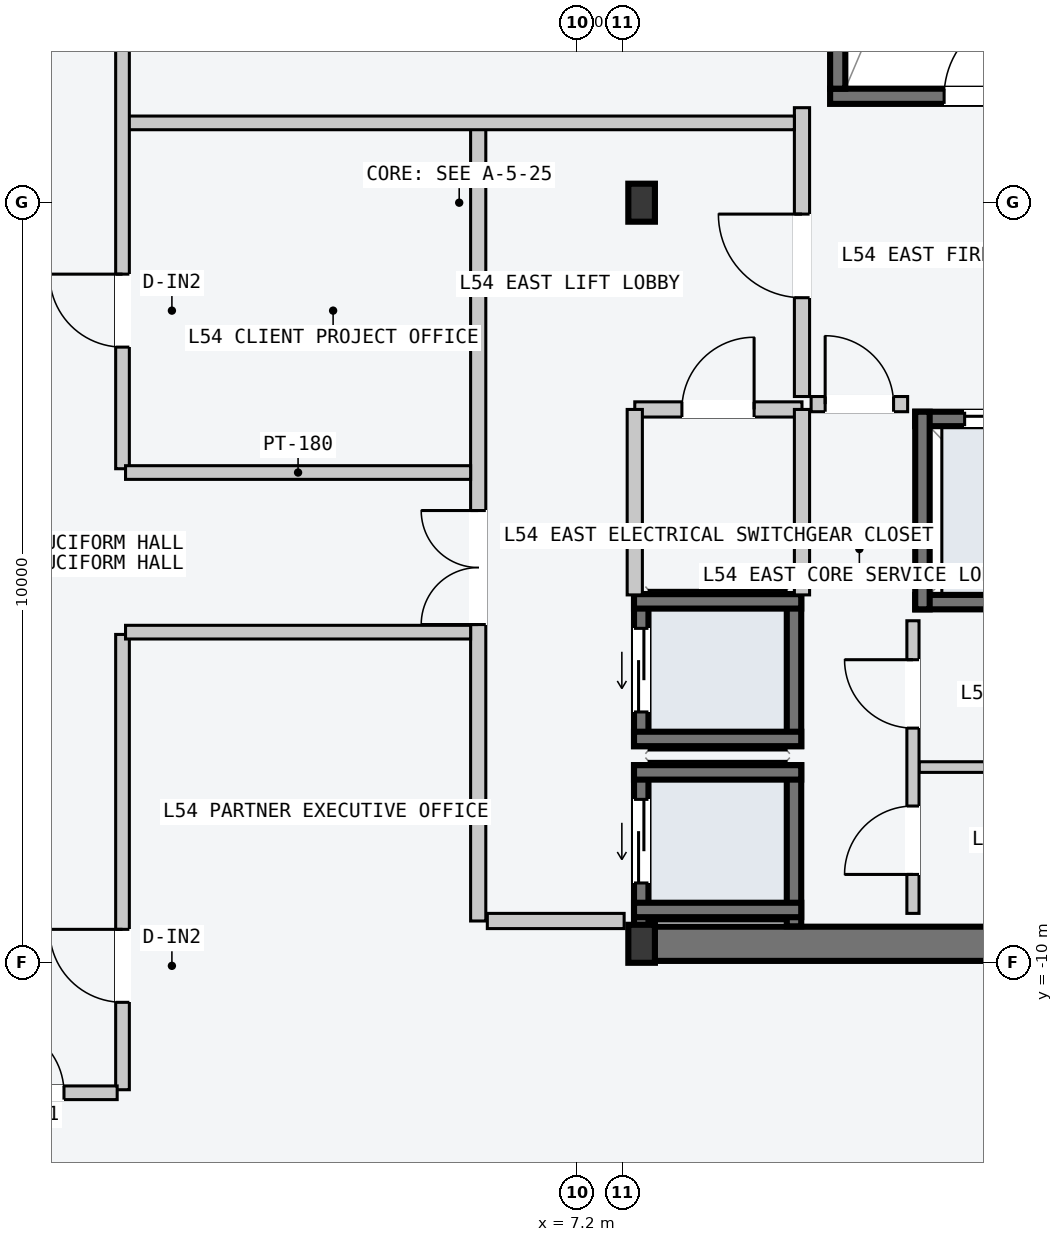
"""IFC4 building model, lengths in metres.
Left out: names, types, materials, properties, quantities, classifications, styles, units other than length and angle.
Written with IfcOpenShell. Run it as: python <this file> out.ifc"""

import sys

from ifc_helpers import new_model, si_unit, direction, frame, frame_2d, origin, origin_2d, place, context, subcontext, project, spatial, rectangle, i_section, extrude, element, fill, save


model = new_model("IFC4")
c1 = context("Model", 3, precision=1e-05, world=origin(), true_north=direction((0.0, 1.0)))
c2 = subcontext(c1, "Body", "Model", "MODEL_VIEW")
j1 = project(units=[si_unit("LENGTHUNIT", "METRE"), si_unit("PLANEANGLEUNIT", "RADIAN")], contexts=[c1])
p1 = place(None, origin())
s1 = spatial("IfcSite", under=j1, at=p1, CompositionType="ELEMENT")
p2 = place(p1, origin())
s2 = spatial("IfcBuilding", under=s1, at=p2, CompositionType="ELEMENT")
p3 = place(p2, frame((0.0, 0.0, 205.5)))
s3 = spatial("IfcBuildingStorey", under=s2, at=p3, CompositionType="ELEMENT", Elevation=205.5)
p4 = place(p3, frame((8.07, -9.75, -0.2), z_axis=(0.0, 0.0, 1.0), x_axis=(1.0, 0.0, 0.0)))
e1 = element("IfcWall", 1, at=p4, inside=s3, PredefinedType="SHEAR", context=c2, shape_type="SweptSolid", body=[
    extrude(rectangle(XDim=6.46, YDim=0.45, at=frame_2d((3.23, 0.0))), origin(), (0.0, 0.0, 1.0), 3.6),
])
p5 = place(p3, frame((10.53, 1.4, -0.2), z_axis=(0.0, 0.0, 1.0), x_axis=(1.0, 0.0, 0.0)))
e2 = element("IfcWall", 2, at=p5, inside=s3, PredefinedType="SOLIDWALL", context=c2, shape_type="SweptSolid", body=[
    extrude(rectangle(XDim=3.72, YDim=0.2, at=frame_2d((1.86, 0.0))), origin(), (0.0, 0.0, 1.0), 3.6),
])
p6 = place(p5, frame((1.5, 0.0, 0.2)))
e3 = element("IfcOpeningElement", 3, at=p6, cuts=e2, PredefinedType="OPENING", context=c2, shape_type="SweptSolid", body=[
    extrude(rectangle(XDim=1.12, YDim=2.18, at=frame_2d((0.56, 1.09))), frame((0.0, 0.11, 0.0), z_axis=(0.0, -1.0, 0.0), x_axis=(1.0, 0.0, 0.0)), (0.0, 0.0, 1.0), 0.22),
])
p7 = place(p3, frame((10.63, 1.5, -0.2), z_axis=(0.0, 0.0, 1.0), x_axis=(0.0, 1.0, 0.0)))
e4 = element("IfcWall", 4, at=p7, inside=s3, PredefinedType="SOLIDWALL", context=c2, shape_type="SweptSolid", body=[
    extrude(rectangle(XDim=7.8, YDim=0.2, at=frame_2d((3.9, 0.0))), origin(), (0.0, 0.0, 1.0), 3.6),
])
for number, where, z_axis, x_axis in (
    (5, (8.05, -9.75, 0.0), (0.0, 0.0, 1.0), (1.0, 0.0, 0.0)),
    (6, (8.05, 0.0, 0.0), (0.0, 0.0, 1.0), (1.0, 0.0, 0.0)),
):
    element("IfcColumn", number, at=place(p3, frame(where, z_axis=z_axis, x_axis=x_axis)), inside=s3, PredefinedType="COLUMN", context=c2, shape_type="SweptSolid", body=[
        extrude(i_section(OverallWidth=0.35, OverallDepth=0.5, WebThickness=0.02, FlangeThickness=0.032, at=origin_2d()), origin(), (0.0, 0.0, 1.0), 3.6),
    ])
p8 = place(p3, frame((8.045, -9.52, -0.2), z_axis=(0.0, 0.0, 1.0), x_axis=(0.0, 1.0, 0.0)))
e7 = element("IfcWall", 7, at=p8, inside=s3, PredefinedType="SOLIDWALL", context=c2, shape_type="SweptSolid", body=[
    extrude(rectangle(XDim=2.12, YDim=0.19, at=frame_2d((1.06, 0.0))), origin(), (0.0, 0.0, 1.0), 3.6),
])
p9 = place(p8, frame((0.57, 0.0, 0.2)))
e8 = element("IfcOpeningElement", 8, at=p9, cuts=e7, PredefinedType="OPENING", context=c2, shape_type="SweptSolid", body=[
    extrude(rectangle(XDim=1.1, YDim=2.2, at=frame_2d((0.55, 1.1))), frame((0.0, 0.105, 0.0), z_axis=(0.0, -1.0, 0.0), x_axis=(1.0, 0.0, 0.0)), (0.0, 0.0, 1.0), 0.21),
])
p10 = place(p3, frame((10.055, -9.52, -0.2), z_axis=(0.0, 0.0, 1.0), x_axis=(0.0, 1.0, 0.0)))
e9 = element("IfcWall", 9, at=p10, inside=s3, PredefinedType="SOLIDWALL", context=c2, shape_type="SweptSolid", body=[
    extrude(rectangle(XDim=2.12, YDim=0.19, at=frame_2d((1.06, 0.0))), origin(), (0.0, 0.0, 1.0), 3.6),
])
for number, where, z_axis, x_axis in (
    (10, (7.95, -7.495, -0.2), (0.0, 0.0, 1.0), (1.0, 0.0, 0.0)),
    (11, (7.95, -9.305, -0.2), (0.0, 0.0, 1.0), (1.0, 0.0, 0.0)),
):
    element("IfcWall", number, at=place(p3, frame(where, z_axis=z_axis, x_axis=x_axis)), inside=s3, PredefinedType="SOLIDWALL", context=c2, shape_type="SweptSolid", body=[
        extrude(rectangle(XDim=2.2, YDim=0.19, at=frame_2d((1.1, 0.0))), origin(), (0.0, 0.0, 1.0), 3.6),
    ])
p11 = place(p3, frame((8.045, -7.15, -0.2), z_axis=(0.0, 0.0, 1.0), x_axis=(0.0, 1.0, 0.0)))
e12 = element("IfcWall", 12, at=p11, inside=s3, PredefinedType="SOLIDWALL", context=c2, shape_type="SweptSolid", body=[
    extrude(rectangle(XDim=2.0, YDim=0.19, at=frame_2d((1.0, 0.0))), origin(), (0.0, 0.0, 1.0), 3.6),
])
p12 = place(p11, frame((0.45, 0.0, 0.2)))
e13 = element("IfcOpeningElement", 13, at=p12, cuts=e12, PredefinedType="OPENING", context=c2, shape_type="SweptSolid", body=[
    extrude(rectangle(XDim=1.1, YDim=2.2, at=frame_2d((0.55, 1.1))), frame((0.0, 0.105, 0.0), z_axis=(0.0, -1.0, 0.0), x_axis=(1.0, 0.0, 0.0)), (0.0, 0.0, 1.0), 0.21),
])
p13 = place(p3, frame((10.055, -7.15, -0.2), z_axis=(0.0, 0.0, 1.0), x_axis=(0.0, 1.0, 0.0)))
e14 = element("IfcWall", 14, at=p13, inside=s3, PredefinedType="SOLIDWALL", context=c2, shape_type="SweptSolid", body=[
    extrude(rectangle(XDim=2.0, YDim=0.19, at=frame_2d((1.0, 0.0))), origin(), (0.0, 0.0, 1.0), 3.6),
])
for number, where, z_axis, x_axis in (
    (15, (7.95, -5.245, -0.2), (0.0, 0.0, 1.0), (1.0, 0.0, 0.0)),
    (16, (7.95, -7.055, -0.2), (0.0, 0.0, 1.0), (1.0, 0.0, 0.0)),
):
    element("IfcWall", number, at=place(p3, frame(where, z_axis=z_axis, x_axis=x_axis)), inside=s3, PredefinedType="SOLIDWALL", context=c2, shape_type="SweptSolid", body=[
        extrude(rectangle(XDim=2.2, YDim=0.19, at=frame_2d((1.1, 0.0))), origin(), (0.0, 0.0, 1.0), 3.6),
    ])
p14 = place(p3, frame((11.65, -2.845, -0.2), z_axis=(0.0, 0.0, 1.0), x_axis=(1.0, 0.0, 0.0)))
e17 = element("IfcWall", 17, at=p14, inside=s3, PredefinedType="SOLIDWALL", context=c2, shape_type="SweptSolid", body=[
    extrude(rectangle(XDim=2.68, YDim=0.19, at=frame_2d((1.34, 0.0))), origin(), (0.0, 0.0, 1.0), 3.6),
])
p15 = place(p14, frame((0.65, 0.0, 0.2)))
e18 = element("IfcOpeningElement", 18, at=p15, cuts=e17, PredefinedType="OPENING", context=c2, shape_type="SweptSolid", body=[
    extrude(rectangle(XDim=1.2, YDim=2.2, at=frame_2d((0.6, 1.1))), frame((0.0, 0.105, 0.0), z_axis=(0.0, -1.0, 0.0), x_axis=(1.0, 0.0, 0.0)), (0.0, 0.0, 1.0), 0.21),
])
p16 = place(p3, frame((11.65, -5.255, -0.2), z_axis=(0.0, 0.0, 1.0), x_axis=(1.0, 0.0, 0.0)))
e19 = element("IfcWall", 19, at=p16, inside=s3, PredefinedType="SOLIDWALL", context=c2, shape_type="SweptSolid", body=[
    extrude(rectangle(XDim=2.68, YDim=0.19, at=frame_2d((1.34, 0.0))), origin(), (0.0, 0.0, 1.0), 3.6),
])
p17 = place(p3, frame((11.745, -5.35, -0.2), z_axis=(0.0, 0.0, 1.0), x_axis=(0.0, 1.0, 0.0)))
e20 = element("IfcWall", 20, at=p17, inside=s3, PredefinedType="SOLIDWALL", context=c2, shape_type="SweptSolid", body=[
    extrude(rectangle(XDim=2.6, YDim=0.19, at=frame_2d((1.3, 0.0))), origin(), (0.0, 0.0, 1.0), 3.6),
])
p18 = place(p3, frame((5.9, -9.45, 0.0), z_axis=(0.0, 0.0, 1.0), x_axis=(0.0, 1.0, 0.0)))
e21 = element("IfcWall", 21, at=p18, inside=s3, PredefinedType="PARTITIONING", context=c2, shape_type="SweptSolid", body=[
    extrude(rectangle(XDim=10.5, YDim=0.2, at=frame_2d((5.25, 0.0))), origin(), (0.0, 0.0, 1.0), 3.4),
])
p19 = place(p18, frame((3.9, 0.0, 0.0)))
e22 = element("IfcOpeningElement", 22, at=p19, cuts=e21, PredefinedType="OPENING", context=c2, shape_type="SweptSolid", body=[
    extrude(rectangle(XDim=1.5, YDim=2.2, at=frame_2d((0.75, 1.1))), frame((0.0, 0.11, 0.0), z_axis=(0.0, -1.0, 0.0), x_axis=(1.0, 0.0, 0.0)), (0.0, 0.0, 1.0), 0.22),
])
p20 = place(p3, frame((6.02, -9.45, 0.0), z_axis=(0.0, 0.0, 1.0), x_axis=(1.0, 0.0, 0.0)))
e23 = element("IfcWall", 23, at=p20, inside=s3, PredefinedType="PARTITIONING", context=c2, shape_type="SweptSolid", body=[
    extrude(rectangle(XDim=1.8, YDim=0.2, at=frame_2d((0.9, 0.0))), origin(), (0.0, 0.0, 1.0), 3.4),
])
p21 = place(p3, frame((10.16, -2.55, 0.0), z_axis=(0.0, 0.0, 1.0), x_axis=(0.0, 1.0, 0.0)))
e24 = element("IfcWall", 24, at=p21, inside=s3, PredefinedType="PARTITIONING", context=c2, shape_type="SweptSolid", body=[
    extrude(rectangle(XDim=3.8, YDim=0.2, at=frame_2d((1.9, 0.0))), origin(), (0.0, 0.0, 1.0), 3.4),
])
p22 = place(p21, frame((1.3, 0.0, 0.0)))
e25 = element("IfcOpeningElement", 25, at=p22, cuts=e24, PredefinedType="OPENING", context=c2, shape_type="SweptSolid", body=[
    extrude(rectangle(XDim=1.1, YDim=2.15, at=frame_2d((0.55, 1.075))), frame((0.0, 0.11, 0.0), z_axis=(0.0, -1.0, 0.0), x_axis=(1.0, 0.0, 0.0)), (0.0, 0.0, 1.0), 0.22),
])
p23 = place(p3, frame((10.28, -2.65, 0.0), z_axis=(0.0, 0.0, 1.0), x_axis=(1.0, 0.0, 0.0)))
e26 = element("IfcWall", 26, at=p23, inside=s3, PredefinedType="PARTITIONING", context=c2, shape_type="SweptSolid", body=[
    extrude(rectangle(XDim=1.27, YDim=0.2, at=frame_2d((0.635, 0.0))), origin(), (0.0, 0.0, 1.0), 3.4),
])
p24 = place(p23, frame((0.185, 0.0, 0.0)))
e27 = element("IfcOpeningElement", 27, at=p24, cuts=e26, PredefinedType="OPENING", context=c2, shape_type="SweptSolid", body=[
    extrude(rectangle(XDim=0.9, YDim=2.15, at=frame_2d((0.45, 1.075))), frame((0.0, 0.11, 0.0), z_axis=(0.0, -1.0, 0.0), x_axis=(1.0, 0.0, 0.0)), (0.0, 0.0, 1.0), 0.22),
])
p25 = place(p3, frame((7.96, -2.72, 0.0), z_axis=(0.0, 0.0, 1.0), x_axis=(1.0, 0.0, 0.0)))
e28 = element("IfcWall", 28, at=p25, inside=s3, PredefinedType="PARTITIONING", context=c2, shape_type="SweptSolid", body=[
    extrude(rectangle(XDim=2.2, YDim=0.2, at=frame_2d((1.1, 0.0))), origin(), (0.0, 0.0, 1.0), 3.4),
])
p26 = place(p25, frame((0.62, 0.0, 0.0)))
e29 = element("IfcOpeningElement", 29, at=p26, cuts=e28, PredefinedType="OPENING", context=c2, shape_type="SweptSolid", body=[
    extrude(rectangle(XDim=0.95, YDim=2.1, at=frame_2d((0.475, 1.05))), frame((0.0, 0.11, 0.0), z_axis=(0.0, -1.0, 0.0), x_axis=(1.0, 0.0, 0.0)), (0.0, 0.0, 1.0), 0.22),
])
for number, where, z_axis, x_axis in (
    (30, (7.96, -5.16, 0.0), (0.0, 0.0, 1.0), (0.0, 1.0, 0.0)),
    (31, (10.16, -5.16, 0.0), (0.0, 0.0, 1.0), (0.0, 1.0, 0.0)),
):
    element("IfcWall", number, at=place(p3, frame(where, z_axis=z_axis, x_axis=x_axis)), inside=s3, PredefinedType="PARTITIONING", context=c2, shape_type="SweptSolid", body=[
        extrude(rectangle(XDim=2.44, YDim=0.2, at=frame_2d((1.22, 0.0))), origin(), (0.0, 0.0, 1.0), 3.4),
    ])
p27 = place(p3, frame((11.7, -7.425, 0.0), z_axis=(0.0, 0.0, 1.0), x_axis=(1.0, 0.0, 0.0)))
e32 = element("IfcWall", 32, at=p27, inside=s3, PredefinedType="PARTITIONING", context=c2, shape_type="SweptSolid", body=[
    extrude(rectangle(XDim=2.5, YDim=0.14, at=frame_2d((1.25, 0.0))), origin(), (0.0, 0.0, 1.0), 3.4),
])
p28 = place(p3, frame((11.62, -9.35, 0.0), z_axis=(0.0, 0.0, 1.0), x_axis=(0.0, 1.0, 0.0)))
e33 = element("IfcWall", 33, at=p28, inside=s3, PredefinedType="PARTITIONING", context=c2, shape_type="SweptSolid", body=[
    extrude(rectangle(XDim=3.85, YDim=0.16, at=frame_2d((1.925, 0.0))), origin(), (0.0, 0.0, 1.0), 3.4),
])
p29 = place(p28, frame((0.512, 0.0, 0.0)))
e34 = element("IfcOpeningElement", 34, at=p29, cuts=e33, PredefinedType="OPENING", context=c2, shape_type="SweptSolid", body=[
    extrude(rectangle(XDim=0.9, YDim=2.15, at=frame_2d((0.45, 1.075))), frame((0.0, 0.09, 0.0), z_axis=(0.0, -1.0, 0.0), x_axis=(1.0, 0.0, 0.0)), (0.0, 0.0, 1.0), 0.18),
])
p30 = place(p28, frame((2.438, 0.0, 0.0)))
e35 = element("IfcOpeningElement", 35, at=p30, cuts=e33, PredefinedType="OPENING", context=c2, shape_type="SweptSolid", body=[
    extrude(rectangle(XDim=0.9, YDim=2.15, at=frame_2d((0.45, 1.075))), frame((0.0, 0.09, 0.0), z_axis=(0.0, -1.0, 0.0), x_axis=(1.0, 0.0, 0.0)), (0.0, 0.0, 1.0), 0.18),
])
p31 = place(p3, frame((1.26, 1.05, 0.0), z_axis=(0.0, 0.0, 1.0), x_axis=(1.0, 0.0, 0.0)))
e36 = element("IfcWall", 36, at=p31, inside=s3, PredefinedType="PARTITIONING", context=c2, shape_type="SweptSolid", body=[
    extrude(rectangle(XDim=8.8, YDim=0.18, at=frame_2d((4.4, 0.0))), origin(), (0.0, 0.0, 1.0), 3.4),
])
p32 = place(p3, frame((1.22, -3.5, 0.0), z_axis=(0.0, 0.0, 1.0), x_axis=(0.0, 1.0, 0.0)))
e37 = element("IfcWall", 37, at=p32, inside=s3, PredefinedType="PARTITIONING", context=c2, shape_type="SweptSolid", body=[
    extrude(rectangle(XDim=15.17, YDim=0.18, at=frame_2d((7.585, 0.0))), origin(), (0.0, 0.0, 1.0), 3.4),
])
p33 = place(p32, frame((6.1, 0.0, 0.0)))
e38 = element("IfcOpeningElement", 38, at=p33, cuts=e37, PredefinedType="OPENING", context=c2, shape_type="SweptSolid", body=[
    extrude(rectangle(XDim=1.24, YDim=2.24, at=frame_2d((0.62, 1.12))), frame((0.0, 0.1, 0.0), z_axis=(0.0, -1.0, 0.0), x_axis=(1.0, 0.0, 0.0)), (0.0, 0.0, 1.0), 0.2),
])
p34 = place(p32, frame((1.6, 0.0, 0.0)))
e39 = element("IfcOpeningElement", 39, at=p34, cuts=e37, PredefinedType="OPENING", context=c2, shape_type="SweptSolid", body=[
    extrude(rectangle(XDim=0.96, YDim=2.18, at=frame_2d((0.48, 1.09))), frame((0.0, 0.1, 0.0), z_axis=(0.0, -1.0, 0.0), x_axis=(1.0, 0.0, 0.0)), (0.0, 0.0, 1.0), 0.2),
])
p35 = place(p3, frame((1.26, -3.55, 0.0), z_axis=(0.0, 0.0, 1.0), x_axis=(1.0, 0.0, 0.0)))
e40 = element("IfcWall", 40, at=p35, inside=s3, PredefinedType="PARTITIONING", context=c2, shape_type="SweptSolid", body=[
    extrude(rectangle(XDim=4.54, YDim=0.18, at=frame_2d((2.27, 0.0))), origin(), (0.0, 0.0, 1.0), 3.4),
])
p36 = place(p3, frame((1.22, -11.67, 0.0), z_axis=(0.0, 0.0, 1.0), x_axis=(0.0, 1.0, 0.0)))
e41 = element("IfcWall", 41, at=p36, inside=s3, PredefinedType="PARTITIONING", context=c2, shape_type="SweptSolid", body=[
    extrude(rectangle(XDim=5.99, YDim=0.18, at=frame_2d((2.995, 0.0))), origin(), (0.0, 0.0, 1.0), 3.4),
])
p37 = place(p36, frame((1.15, 0.0, 0.0)))
e42 = element("IfcOpeningElement", 42, at=p37, cuts=e41, PredefinedType="OPENING", context=c2, shape_type="SweptSolid", body=[
    extrude(rectangle(XDim=0.96, YDim=2.18, at=frame_2d((0.48, 1.09))), frame((0.0, 0.1, 0.0), z_axis=(0.0, -1.0, 0.0), x_axis=(1.0, 0.0, 0.0)), (0.0, 0.0, 1.0), 0.2),
])
p38 = place(p3, frame((1.26, -5.65, 0.0), z_axis=(0.0, 0.0, 1.0), x_axis=(1.0, 0.0, 0.0)))
e43 = element("IfcWall", 43, at=p38, inside=s3, PredefinedType="PARTITIONING", context=c2, shape_type="SweptSolid", body=[
    extrude(rectangle(XDim=4.54, YDim=0.18, at=frame_2d((2.27, 0.0))), origin(), (0.0, 0.0, 1.0), 3.4),
])
p39 = place(p3, frame((-1.15, -11.71, 0.0), z_axis=(0.0, 0.0, 1.0), x_axis=(1.0, 0.0, 0.0)))
e44 = element("IfcWall", 44, at=p39, inside=s3, PredefinedType="PARTITIONING", context=c2, shape_type="SweptSolid", body=[
    extrude(rectangle(XDim=2.3, YDim=0.18, at=frame_2d((1.15, 0.0))), origin(), (0.0, 0.0, 1.0), 3.4),
])
p40 = place(p39, frame((0.7, 0.0, 0.0)))
e45 = element("IfcOpeningElement", 45, at=p40, cuts=e44, PredefinedType="OPENING", context=c2, shape_type="SweptSolid", body=[
    extrude(rectangle(XDim=0.9, YDim=2.15, at=frame_2d((0.45, 1.075))), frame((0.0, 0.1, 0.0), z_axis=(0.0, -1.0, 0.0), x_axis=(1.0, 0.0, 0.0)), (0.0, 0.0, 1.0), 0.2),
])
p41 = place(p6, origin())
e46 = element("IfcDoor", 46, at=p41, inside=s3, OperationType="SINGLE_SWING_RIGHT", PredefinedType="DOOR", context=c2, shape_type="SweptSolid", body=[
    extrude(rectangle(XDim=1.12, YDim=2.18, at=frame_2d((0.56, 1.09))), frame((0.0, 0.025, 0.0), z_axis=(0.0, -1.0, 0.0), x_axis=(1.0, 0.0, 0.0)), (0.0, 0.0, 1.0), 0.05),
])
fill(e3, e46)
p42 = place(p9, origin())
e47 = element("IfcDoor", 47, at=p42, inside=s3, OperationType="SLIDING_TO_LEFT", PredefinedType="DOOR", context=c2, shape_type="SweptSolid", body=[
    extrude(rectangle(XDim=1.1, YDim=2.2, at=frame_2d((0.55, 1.1))), frame((0.0, 0.025, 0.0), z_axis=(0.0, -1.0, 0.0), x_axis=(1.0, 0.0, 0.0)), (0.0, 0.0, 1.0), 0.05),
])
fill(e8, e47)
p43 = place(p12, origin())
e48 = element("IfcDoor", 48, at=p43, inside=s3, OperationType="SLIDING_TO_LEFT", PredefinedType="DOOR", context=c2, shape_type="SweptSolid", body=[
    extrude(rectangle(XDim=1.1, YDim=2.2, at=frame_2d((0.55, 1.1))), frame((0.0, 0.025, 0.0), z_axis=(0.0, -1.0, 0.0), x_axis=(1.0, 0.0, 0.0)), (0.0, 0.0, 1.0), 0.05),
])
fill(e13, e48)
p44 = place(p15, origin())
e49 = element("IfcDoor", 49, at=p44, inside=s3, OperationType="SLIDING_TO_LEFT", PredefinedType="DOOR", context=c2, shape_type="SweptSolid", body=[
    extrude(rectangle(XDim=1.2, YDim=2.2, at=frame_2d((0.6, 1.1))), frame((0.0, 0.025, 0.0), z_axis=(0.0, -1.0, 0.0), x_axis=(1.0, 0.0, 0.0)), (0.0, 0.0, 1.0), 0.05),
])
fill(e18, e49)
p45 = place(p19, origin())
e50 = element("IfcDoor", 50, at=p45, inside=s3, OperationType="DOUBLE_DOOR_SINGLE_SWING", PredefinedType="DOOR", context=c2, shape_type="SweptSolid", body=[
    extrude(rectangle(XDim=1.5, YDim=2.2, at=frame_2d((0.75, 1.1))), frame((0.0, 0.025, 0.0), z_axis=(0.0, -1.0, 0.0), x_axis=(1.0, 0.0, 0.0)), (0.0, 0.0, 1.0), 0.05),
])
fill(e22, e50)
p46 = place(p22, origin())
e51 = element("IfcDoor", 51, at=p46, inside=s3, OperationType="SINGLE_SWING_RIGHT", PredefinedType="DOOR", context=c2, shape_type="SweptSolid", body=[
    extrude(rectangle(XDim=1.1, YDim=2.15, at=frame_2d((0.55, 1.075))), frame((0.0, 0.025, 0.0), z_axis=(0.0, -1.0, 0.0), x_axis=(1.0, 0.0, 0.0)), (0.0, 0.0, 1.0), 0.05),
])
fill(e25, e51)
p47 = place(p24, origin())
e52 = element("IfcDoor", 52, at=p47, inside=s3, OperationType="SINGLE_SWING_LEFT", PredefinedType="DOOR", context=c2, shape_type="SweptSolid", body=[
    extrude(rectangle(XDim=0.9, YDim=2.15, at=frame_2d((0.45, 1.075))), frame((0.0, 0.025, 0.0), z_axis=(0.0, -1.0, 0.0), x_axis=(1.0, 0.0, 0.0)), (0.0, 0.0, 1.0), 0.05),
])
fill(e27, e52)
p48 = place(p26, origin())
e53 = element("IfcDoor", 53, at=p48, inside=s3, OperationType="SINGLE_SWING_RIGHT", PredefinedType="DOOR", context=c2, shape_type="SweptSolid", body=[
    extrude(rectangle(XDim=0.95, YDim=2.1, at=frame_2d((0.475, 1.05))), frame((0.0, 0.025, 0.0), z_axis=(0.0, -1.0, 0.0), x_axis=(1.0, 0.0, 0.0)), (0.0, 0.0, 1.0), 0.05),
])
fill(e29, e53)
p49 = place(p29, origin())
e54 = element("IfcDoor", 54, at=p49, inside=s3, OperationType="SINGLE_SWING_LEFT", PredefinedType="DOOR", context=c2, shape_type="SweptSolid", body=[
    extrude(rectangle(XDim=0.9, YDim=2.15, at=frame_2d((0.45, 1.075))), frame((0.0, 0.025, 0.0), z_axis=(0.0, -1.0, 0.0), x_axis=(1.0, 0.0, 0.0)), (0.0, 0.0, 1.0), 0.05),
])
fill(e34, e54)
p50 = place(p30, origin())
e55 = element("IfcDoor", 55, at=p50, inside=s3, OperationType="SINGLE_SWING_RIGHT", PredefinedType="DOOR", context=c2, shape_type="SweptSolid", body=[
    extrude(rectangle(XDim=0.9, YDim=2.15, at=frame_2d((0.45, 1.075))), frame((0.0, 0.025, 0.0), z_axis=(0.0, -1.0, 0.0), x_axis=(1.0, 0.0, 0.0)), (0.0, 0.0, 1.0), 0.05),
])
fill(e35, e55)
p51 = place(p34, origin())
e56 = element("IfcDoor", 56, at=p51, inside=s3, OperationType="SINGLE_SWING_RIGHT", PredefinedType="DOOR", context=c2, shape_type="SweptSolid", body=[
    extrude(rectangle(XDim=0.96, YDim=2.18, at=frame_2d((0.48, 1.09))), frame((0.0, 0.025, 0.0), z_axis=(0.0, -1.0, 0.0), x_axis=(1.0, 0.0, 0.0)), (0.0, 0.0, 1.0), 0.05),
])
fill(e39, e56)
p52 = place(p37, origin())
e57 = element("IfcDoor", 57, at=p52, inside=s3, OperationType="SINGLE_SWING_RIGHT", PredefinedType="DOOR", context=c2, shape_type="SweptSolid", body=[
    extrude(rectangle(XDim=0.96, YDim=2.18, at=frame_2d((0.48, 1.09))), frame((0.0, 0.025, 0.0), z_axis=(0.0, -1.0, 0.0), x_axis=(1.0, 0.0, 0.0)), (0.0, 0.0, 1.0), 0.05),
])
fill(e42, e57)
p53 = place(p40, origin())
e58 = element("IfcDoor", 58, at=p53, inside=s3, OperationType="SINGLE_SWING_LEFT", PredefinedType="DOOR", context=c2, shape_type="SweptSolid", body=[
    extrude(rectangle(XDim=0.9, YDim=2.15, at=frame_2d((0.45, 1.075))), frame((0.0, 0.025, 0.0), z_axis=(0.0, -1.0, 0.0), x_axis=(1.0, 0.0, 0.0)), (0.0, 0.0, 1.0), 0.05),
])
fill(e45, e58)
save(model, sys.argv[1])
